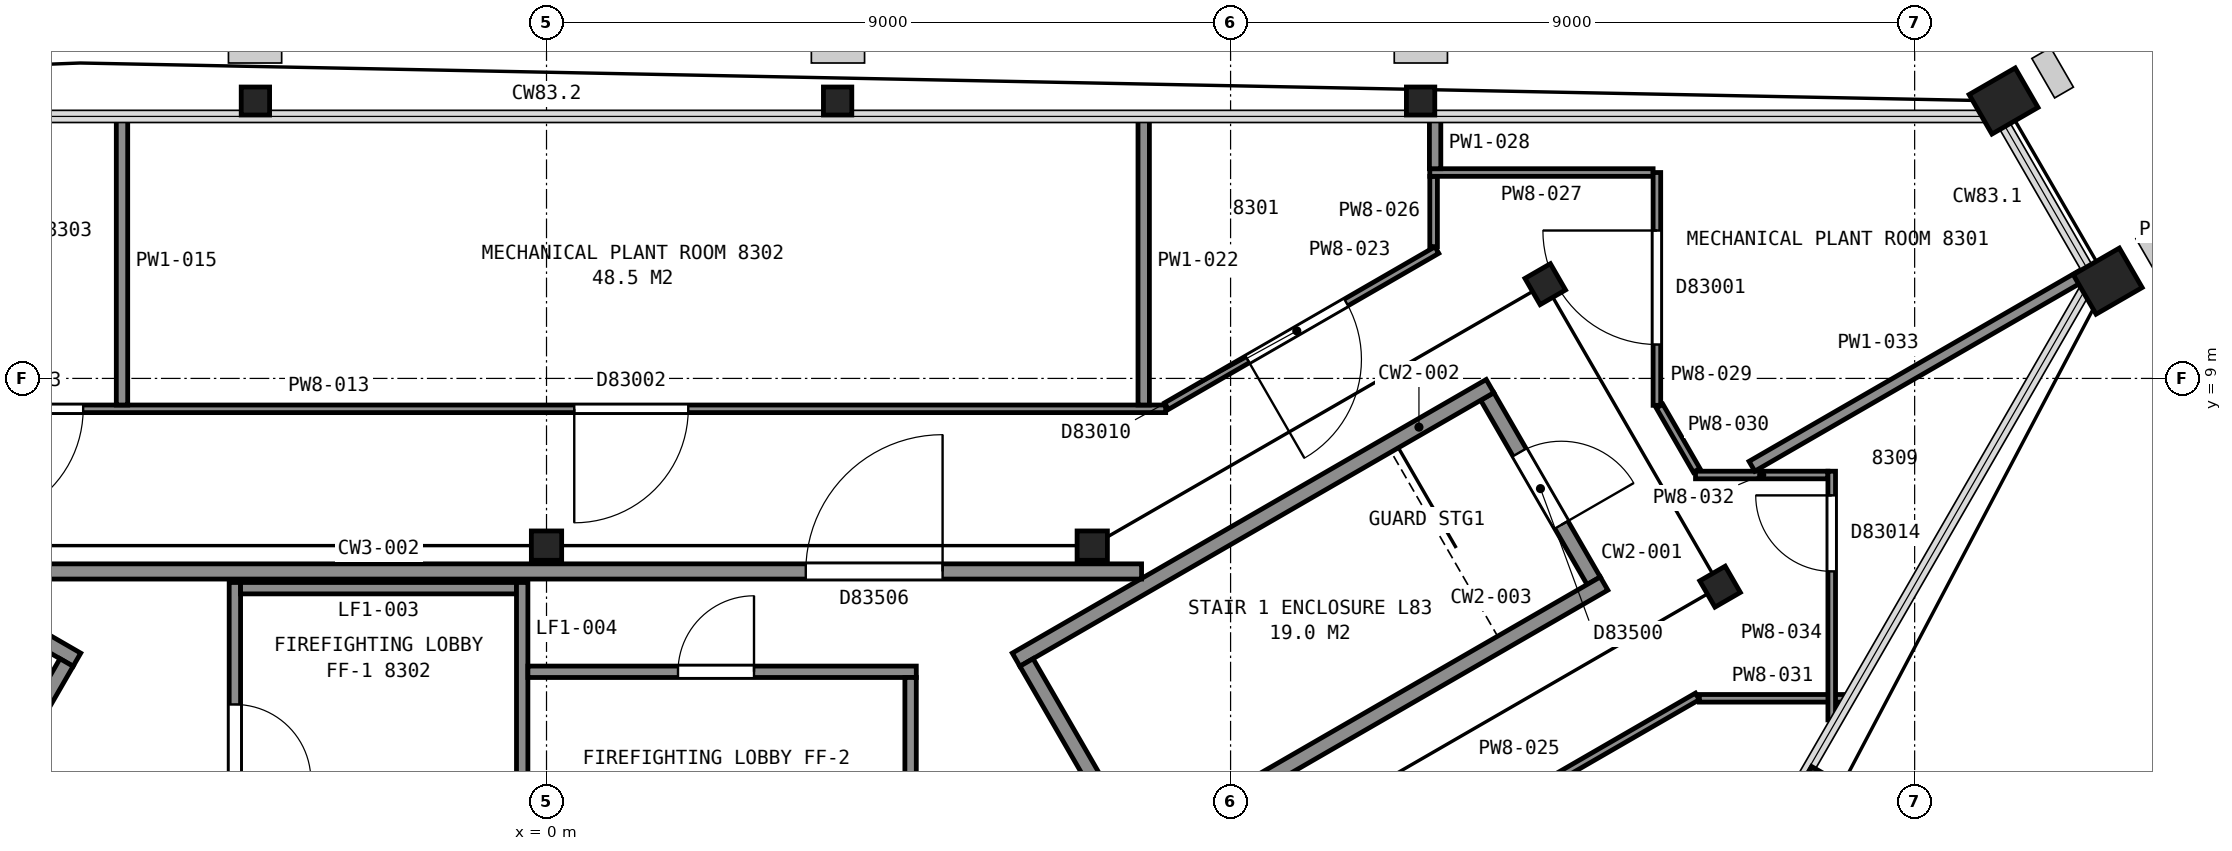
"""IFC4 building model, lengths in metres.
Left out: names, types, materials, properties, quantities, classifications, styles, units other than length and angle.
Written with IfcOpenShell. Run it as: python <this file> out.ifc"""

import sys

from ifc_helpers import new_model, si_unit, direction, frame, frame_2d, origin, origin_2d, place, context, subcontext, project, spatial, rectangle, hollow_rectangle, i_section, extrude, element, fill, save


model = new_model("IFC4")
c1 = context("Model", 3, precision=1e-05, world=origin(), true_north=direction((0.0, 1.0)))
c2 = subcontext(c1, "Body", "Model", "MODEL_VIEW")
j1 = project(units=[si_unit("LENGTHUNIT", "METRE"), si_unit("PLANEANGLEUNIT", "RADIAN")], contexts=[c1])
p1 = place(None, origin())
s1 = spatial("IfcSite", under=j1, at=p1, CompositionType="ELEMENT")
p2 = place(p1, origin())
s2 = spatial("IfcBuilding", under=s1, at=p2, CompositionType="ELEMENT")
p3 = place(p2, frame((0.0, 0.0, 329.4)))
s3 = spatial("IfcBuildingStorey", under=s2, at=p3, CompositionType="ELEMENT", Elevation=329.4)
p4 = place(p3, frame((19.17, 12.65, 0.0), z_axis=(0.0, 0.0, 1.0), x_axis=(0.5, -0.866025403784, 0.0)))
e1 = element("IfcColumn", 1, at=p4, inside=s3, PredefinedType="COLUMN", context=c2, shape_type="SweptSolid", body=[
    extrude(hollow_rectangle(XDim=0.6, YDim=0.7, WallThickness=0.04, at=origin_2d()), origin(), (0.0, 0.0, 1.0), 3.9),
])
p5 = place(p3, frame((11.5, 12.65, 0.0), z_axis=(0.0, 0.0, 1.0), x_axis=(1.0, 0.0, 0.0)))
e2 = element("IfcColumn", 2, at=p5, inside=s3, PredefinedType="COLUMN", context=c2, shape_type="SweptSolid", body=[
    extrude(i_section(OverallWidth=0.373, OverallDepth=0.368, WebThickness=0.015, FlangeThickness=0.024, FilletRadius=0.015, at=origin_2d()), origin(), (0.0, 0.0, 1.0), 4.13),
])
p6 = place(p3, frame((3.83, 12.65, 0.0), z_axis=(0.0, 0.0, 1.0), x_axis=(1.0, 0.0, 0.0)))
e3 = element("IfcColumn", 3, at=p6, inside=s3, PredefinedType="COLUMN", context=c2, shape_type="SweptSolid", body=[
    extrude(i_section(OverallWidth=0.373, OverallDepth=0.368, WebThickness=0.015, FlangeThickness=0.024, FilletRadius=0.015, at=origin_2d()), origin(), (0.0, 0.0, 1.0), 4.37),
])
p7 = place(p3, frame((-3.83, 12.65, 0.0), z_axis=(0.0, 0.0, 1.0), x_axis=(1.0, 0.0, 0.0)))
e4 = element("IfcColumn", 4, at=p7, inside=s3, PredefinedType="COLUMN", context=c2, shape_type="SweptSolid", body=[
    extrude(i_section(OverallWidth=0.373, OverallDepth=0.368, WebThickness=0.015, FlangeThickness=0.024, FilletRadius=0.015, at=origin_2d()), origin(), (0.0, 0.0, 1.0), 4.6),
])
p8 = place(p3, frame((16.71, 3.64, 0.0), z_axis=(0.0, 0.0, 1.0), x_axis=(-0.5, -0.866025403784, 0.0)))
e5 = element("IfcColumn", 5, at=p8, inside=s3, PredefinedType="COLUMN", context=c2, shape_type="SweptSolid", body=[
    extrude(i_section(OverallWidth=0.373, OverallDepth=0.368, WebThickness=0.015, FlangeThickness=0.024, FilletRadius=0.015, at=origin_2d()), origin(), (0.0, 0.0, 1.0), 4.34),
])
p9 = place(p3, frame((20.54, 10.28, 0.0), z_axis=(0.0, 0.0, 1.0), x_axis=(0.5, -0.866025403784, 0.0)))
e6 = element("IfcColumn", 6, at=p9, inside=s3, PredefinedType="COLUMN", context=c2, shape_type="SweptSolid", body=[
    extrude(hollow_rectangle(XDim=0.6, YDim=0.7, WallThickness=0.04, at=origin_2d()), origin(), (0.0, 0.0, 1.0), 3.9),
])
for number, where, z_axis, x_axis in (
    (7, (15.44, 6.26, 0.0), (0.0, 0.0, 1.0), (0.5, -0.866, 0.0)),
    (8, (13.14, 10.24, 0.0), (0.0, 0.0, 1.0), (0.5, -0.866, 0.0)),
    (9, (7.18, 6.8, 0.0), (0.0, 0.0, 1.0), (1.0, 0.0, 0.0)),
    (10, (0.0, 6.8, 0.0), (0.0, 0.0, 1.0), (1.0, 0.0, 0.0)),
):
    element("IfcColumn", number, at=place(p3, frame(where, z_axis=z_axis, x_axis=x_axis)), inside=s3, PredefinedType="COLUMN", context=c2, shape_type="SweptSolid", body=[
        extrude(i_section(OverallWidth=0.399, OverallDepth=0.386, WebThickness=0.021, FlangeThickness=0.033, FilletRadius=0.015, at=origin_2d()), origin(), (0.0, 0.0, 1.0), 4.2),
    ])
p10 = place(p3, frame((13.777, 6.338, 0.0), z_axis=(0.0, 0.0, 1.0), x_axis=(-0.500049511043, 0.865996816683, 0.0)))
e11 = element("IfcWall", 11, at=p10, inside=s3, PredefinedType="PARTITIONING", context=c2, shape_type="SweptSolid", body=[
    extrude(rectangle(XDim=2.8, YDim=0.2, at=frame_2d((1.4, 0.0))), origin(), (0.0, 0.0, 1.0), 4.2),
])
p11 = place(p10, frame((0.85, 0.0, 0.0)))
e12 = element("IfcOpeningElement", 12, at=p11, cuts=e11, PredefinedType="OPENING", context=c2, shape_type="SweptSolid", body=[
    extrude(rectangle(XDim=1.1, YDim=2.1, at=frame_2d((0.55, 1.05))), frame((0.0, 0.11, 0.0), z_axis=(0.0, -1.0, 0.0), x_axis=(1.0, 0.0, 0.0)), (0.0, 0.0, 1.0), 0.22),
])
for number, where, z_axis, x_axis in (
    (13, (6.178, 5.299, 0.0), (0.0, 0.0, 1.0), (0.866, 0.5, 0.0)),
    (14, (7.678, 2.701, 0.0), (0.0, 0.0, 1.0), (0.866, 0.5, 0.0)),
):
    element("IfcWall", number, at=place(p3, frame(where, z_axis=z_axis, x_axis=x_axis)), inside=s3, PredefinedType="PARTITIONING", context=c2, shape_type="SweptSolid", body=[
        extrude(rectangle(XDim=7.2, YDim=0.2, at=frame_2d((3.6, 0.0))), origin(), (0.0, 0.0, 1.0), 4.2),
    ])
p12 = place(p3, frame((7.715, 2.838, 0.0), z_axis=(0.0, 0.0, 1.0), x_axis=(-0.500049511043, 0.865996816683, 0.0)))
e15 = element("IfcWall", 15, at=p12, inside=s3, PredefinedType="PARTITIONING", context=c2, shape_type="SweptSolid", body=[
    extrude(rectangle(XDim=2.8, YDim=0.2, at=frame_2d((1.4, 0.0))), origin(), (0.0, 0.0, 1.0), 4.2),
])
p13 = place(p3, frame((-6.178, 5.299, 0.0), z_axis=(0.0, 0.0, 1.0), x_axis=(-0.866033125095, 0.499986626058, 0.0)))
e16 = element("IfcWall", 16, at=p13, inside=s3, PredefinedType="PARTITIONING", context=c2, shape_type="SweptSolid", body=[
    extrude(rectangle(XDim=7.2, YDim=0.2, at=frame_2d((3.6, 0.0))), origin(), (0.0, 0.0, 1.0), 4.2),
])
p14 = place(p3, frame((-6.315, 5.262, 0.0), z_axis=(0.0, 0.0, 1.0), x_axis=(-0.500049511043, -0.865996816683, 0.0)))
e17 = element("IfcWall", 17, at=p14, inside=s3, PredefinedType="PARTITIONING", context=c2, shape_type="SweptSolid", body=[
    extrude(rectangle(XDim=2.8, YDim=0.2, at=frame_2d((1.4, 0.0))), origin(), (0.0, 0.0, 1.0), 4.2),
])
p15 = place(p3, frame((7.829, 6.46, 0.0), z_axis=(0.0, 0.0, 1.0), x_axis=(-1.0, 0.0, 0.0)))
e18 = element("IfcWall", 18, at=p15, inside=s3, PredefinedType="PARTITIONING", context=c2, shape_type="SweptSolid", body=[
    extrude(rectangle(XDim=15.658, YDim=0.2, at=frame_2d((7.829, 0.0))), origin(), (0.0, 0.0, 1.0), 3.9),
])
p16 = place(p15, frame((2.618, 0.0, 0.0)))
e19 = element("IfcOpeningElement", 19, at=p16, cuts=e18, PredefinedType="OPENING", context=c2, shape_type="SweptSolid", body=[
    extrude(rectangle(XDim=1.8, YDim=2.1, at=frame_2d((0.9, 1.05))), frame((0.0, 0.11, 0.0), z_axis=(0.0, -1.0, 0.0), x_axis=(1.0, 0.0, 0.0)), (0.0, 0.0, 1.0), 0.22),
])
p17 = place(p3, frame((-4.1, 2.085, 0.0), z_axis=(0.0, 0.0, 1.0), x_axis=(0.0, 1.0, 0.0)))
e20 = element("IfcWall", 20, at=p17, inside=s3, PredefinedType="PARTITIONING", context=c2, shape_type="SweptSolid", body=[
    extrude(rectangle(XDim=4.23, YDim=0.15, at=frame_2d((2.115, 0.0))), origin(), (0.0, 0.0, 1.0), 3.9),
])
p18 = place(p17, frame((1.625, 0.0, 0.0)))
e21 = element("IfcOpeningElement", 21, at=p18, cuts=e20, PredefinedType="OPENING", context=c2, shape_type="SweptSolid", body=[
    extrude(rectangle(XDim=1.0, YDim=2.1, at=frame_2d((0.5, 1.05))), frame((0.0, 0.085, 0.0), z_axis=(0.0, -1.0, 0.0), x_axis=(1.0, 0.0, 0.0)), (0.0, 0.0, 1.0), 0.17),
])
p19 = place(p3, frame((-4.025, 6.24, 0.0), z_axis=(0.0, 0.0, 1.0), x_axis=(1.0, 0.0, 0.0)))
e22 = element("IfcWall", 22, at=p19, inside=s3, PredefinedType="PARTITIONING", context=c2, shape_type="SweptSolid", body=[
    extrude(rectangle(XDim=3.63, YDim=0.15, at=frame_2d((1.815, 0.0))), origin(), (0.0, 0.0, 1.0), 3.9),
])
p20 = place(p3, frame((-0.32, 2.252, 0.0), z_axis=(0.0, 0.0, 1.0), x_axis=(0.0, 1.0, 0.0)))
e23 = element("IfcWall", 23, at=p20, inside=s3, PredefinedType="PARTITIONING", context=c2, shape_type="SweptSolid", body=[
    extrude(rectangle(XDim=4.063, YDim=0.15, at=frame_2d((2.031, 0.0))), origin(), (0.0, 0.0, 1.0), 3.9),
])
p21 = place(p3, frame((-0.245, 5.14, 0.0), z_axis=(0.0, 0.0, 1.0), x_axis=(1.0, 0.0, 0.0)))
e24 = element("IfcWall", 24, at=p21, inside=s3, PredefinedType="PARTITIONING", context=c2, shape_type="SweptSolid", body=[
    extrude(rectangle(XDim=5.11, YDim=0.15, at=frame_2d((2.555, 0.0))), origin(), (0.0, 0.0, 1.0), 3.9),
])
p22 = place(p21, frame((1.975, 0.0, 0.0)))
e25 = element("IfcOpeningElement", 25, at=p22, cuts=e24, PredefinedType="OPENING", context=c2, shape_type="SweptSolid", body=[
    extrude(rectangle(XDim=1.0, YDim=2.1, at=frame_2d((0.5, 1.05))), frame((0.0, 0.085, 0.0), z_axis=(0.0, -1.0, 0.0), x_axis=(1.0, 0.0, 0.0)), (0.0, 0.0, 1.0), 0.17),
])
p23 = place(p3, frame((4.79, 2.085, 0.0), z_axis=(0.0, 0.0, 1.0), x_axis=(0.0, 1.0, 0.0)))
e26 = element("IfcWall", 26, at=p23, inside=s3, PredefinedType="PARTITIONING", context=c2, shape_type="SweptSolid", body=[
    extrude(rectangle(XDim=2.98, YDim=0.15, at=frame_2d((1.49, 0.0))), origin(), (0.0, 0.0, 1.0), 3.9),
])
p24 = place(p3, frame((-8.146, 8.6, 0.0), z_axis=(0.0, 0.0, 1.0), x_axis=(1.0, 0.0, 0.0)))
e27 = element("IfcWall", 27, at=p24, inside=s3, PredefinedType="PARTITIONING", context=c2, shape_type="SweptSolid", body=[
    extrude(rectangle(XDim=16.292, YDim=0.1, at=frame_2d((8.146, 0.0))), origin(), (0.0, 0.0, 1.0), 3.297),
])
p25 = place(p24, frame((8.511, 0.0, 0.0)))
e28 = element("IfcOpeningElement", 28, at=p25, cuts=e27, PredefinedType="OPENING", context=c2, shape_type="SweptSolid", body=[
    extrude(rectangle(XDim=1.5, YDim=2.1, at=frame_2d((0.75, 1.05))), frame((0.0, 0.06, 0.0), z_axis=(0.0, -1.0, 0.0), x_axis=(1.0, 0.0, 0.0)), (0.0, 0.0, 1.0), 0.12),
])
p26 = place(p24, frame((0.55, 0.0, 0.0)))
e29 = element("IfcOpeningElement", 29, at=p26, cuts=e27, PredefinedType="OPENING", context=c2, shape_type="SweptSolid", body=[
    extrude(rectangle(XDim=1.5, YDim=2.1, at=frame_2d((0.75, 1.05))), frame((0.0, 0.06, 0.0), z_axis=(0.0, -1.0, 0.0), x_axis=(1.0, 0.0, 0.0)), (0.0, 0.0, 1.0), 0.12),
])
for number, where, z_axis, x_axis in (
    (30, (-5.585, 8.65, 0.0), (0.0, 0.0, 1.0), (0.0, 1.0, 0.0)),
    (31, (7.857, 8.65, 0.0), (0.0, 0.0, 1.0), (0.0, 1.0, 0.0)),
):
    element("IfcWall", number, at=place(p3, frame(where, z_axis=z_axis, x_axis=x_axis)), inside=s3, PredefinedType="PARTITIONING", context=c2, shape_type="SweptSolid", body=[
        extrude(rectangle(XDim=3.783, YDim=0.15, at=frame_2d((1.892, 0.0))), origin(), (0.0, 0.0, 1.0), 3.297),
    ])
p27 = place(p3, frame((8.157, 8.635, 0.0), z_axis=(0.0, 0.0, 1.0), x_axis=(0.866029215606, 0.499993397673, 0.0)))
e32 = element("IfcWall", 32, at=p27, inside=s3, PredefinedType="PARTITIONING", context=c2, shape_type="SweptSolid", body=[
    extrude(rectangle(XDim=4.108, YDim=0.1, at=frame_2d((2.054, 0.0))), origin(), (0.0, 0.0, 1.0), 3.297),
])
p28 = place(p27, frame((1.23, 0.0, 0.0)))
e33 = element("IfcOpeningElement", 33, at=p28, cuts=e32, PredefinedType="OPENING", context=c2, shape_type="SweptSolid", body=[
    extrude(rectangle(XDim=1.5, YDim=2.1, at=frame_2d((0.75, 1.05))), frame((0.0, 0.06, 0.0), z_axis=(0.0, -1.0, 0.0), x_axis=(1.0, 0.0, 0.0)), (0.0, 0.0, 1.0), 0.12),
])
p29 = place(p3, frame((11.557, 2.746, 0.0), z_axis=(0.0, 0.0, 1.0), x_axis=(0.866005840187, 0.500033883614, 0.0)))
e34 = element("IfcWall", 34, at=p29, inside=s3, PredefinedType="PARTITIONING", context=c2, shape_type="SweptSolid", body=[
    extrude(rectangle(XDim=4.139, YDim=0.1, at=frame_2d((2.07, 0.0))), origin(), (0.0, 0.0, 1.0), 3.297),
])
p30 = place(p3, frame((11.671, 10.734, 0.0), z_axis=(0.0, 0.0, 1.0), x_axis=(0.0, 1.0, 0.0)))
e35 = element("IfcWall", 35, at=p30, inside=s3, PredefinedType="PARTITIONING", context=c2, shape_type="SweptSolid", body=[
    extrude(rectangle(XDim=0.925, YDim=0.1, at=frame_2d((0.462, 0.0))), origin(), (0.0, 0.0, 1.0), 3.297),
])
p31 = place(p3, frame((11.621, 11.709, 0.0), z_axis=(0.0, 0.0, 1.0), x_axis=(1.0, 0.0, 0.0)))
e36 = element("IfcWall", 36, at=p31, inside=s3, PredefinedType="PARTITIONING", context=c2, shape_type="SweptSolid", body=[
    extrude(rectangle(XDim=2.938, YDim=0.1, at=frame_2d((1.469, 0.0))), origin(), (0.0, 0.0, 1.0), 3.297),
])
p32 = place(p3, frame((11.691, 11.759, 0.0), z_axis=(0.0, 0.0, 1.0), x_axis=(0.0, 1.0, 0.0)))
e37 = element("IfcWall", 37, at=p32, inside=s3, PredefinedType="PARTITIONING", context=c2, shape_type="SweptSolid", body=[
    extrude(rectangle(XDim=0.674, YDim=0.15, at=frame_2d((0.337, 0.0))), origin(), (0.0, 0.0, 1.0), 3.297),
])
p33 = place(p3, frame((14.609, 11.709, 0.0), z_axis=(0.0, 0.0, 1.0), x_axis=(0.0, -1.0, 0.0)))
e38 = element("IfcWall", 38, at=p33, inside=s3, PredefinedType="PARTITIONING", context=c2, shape_type="SweptSolid", body=[
    extrude(rectangle(XDim=3.063, YDim=0.1, at=frame_2d((1.531, 0.0))), origin(), (0.0, 0.0, 1.0), 3.297),
])
p34 = place(p33, frame((0.763, 0.0, 0.0)))
e39 = element("IfcOpeningElement", 39, at=p34, cuts=e38, PredefinedType="OPENING", context=c2, shape_type="SweptSolid", body=[
    extrude(rectangle(XDim=1.5, YDim=2.1, at=frame_2d((0.75, 1.05))), frame((0.0, 0.06, 0.0), z_axis=(0.0, -1.0, 0.0), x_axis=(1.0, 0.0, 0.0)), (0.0, 0.0, 1.0), 0.12),
])
p35 = place(p3, frame((14.644, 8.635, 0.0), z_axis=(0.0, 0.0, 1.0), x_axis=(0.499823463829, -0.866127303003, 0.0)))
e40 = element("IfcWall", 40, at=p35, inside=s3, PredefinedType="PARTITIONING", context=c2, shape_type="SweptSolid", body=[
    extrude(rectangle(XDim=0.976, YDim=0.1, at=frame_2d((0.488, 0.0))), origin(), (0.0, 0.0, 1.0), 3.297),
])
p36 = place(p3, frame((15.168, 4.791, 0.0), z_axis=(0.0, 0.0, 1.0), x_axis=(1.0, 0.0, 0.0)))
e41 = element("IfcWall", 41, at=p36, inside=s3, PredefinedType="PARTITIONING", context=c2, shape_type="SweptSolid", body=[
    extrude(rectangle(XDim=1.926, YDim=0.1, at=frame_2d((0.963, 0.0))), origin(), (0.0, 0.0, 1.0), 3.297),
])
p37 = place(p3, frame((15.117, 7.729, 0.0), z_axis=(0.0, 0.0, 1.0), x_axis=(1.0, 0.0, 0.0)))
e42 = element("IfcWall", 42, at=p37, inside=s3, PredefinedType="PARTITIONING", context=c2, shape_type="SweptSolid", body=[
    extrude(rectangle(XDim=1.742, YDim=0.1, at=frame_2d((0.871, 0.0))), origin(), (0.0, 0.0, 1.0), 3.297),
])
p38 = place(p3, frame((15.859, 7.844, 0.0), z_axis=(0.0, 0.0, 1.0), x_axis=(0.865941920763, 0.500144568965, 0.0)))
e43 = element("IfcWall", 43, at=p38, inside=s3, PredefinedType="PARTITIONING", context=c2, shape_type="SweptSolid", body=[
    extrude(rectangle(XDim=5.106, YDim=0.15, at=frame_2d((2.553, 0.0))), origin(), (0.0, 0.0, 1.0), 3.297),
])
p39 = place(p3, frame((16.909, 7.779, 0.0), z_axis=(0.0, 0.0, 1.0), x_axis=(0.0, -1.0, 0.0)))
e44 = element("IfcWall", 44, at=p39, inside=s3, PredefinedType="PARTITIONING", context=c2, shape_type="SweptSolid", body=[
    extrude(rectangle(XDim=3.272, YDim=0.1, at=frame_2d((1.636, 0.0))), origin(), (0.0, 0.0, 1.0), 3.297),
])
p40 = place(p39, frame((0.318, 0.0, 0.0)))
e45 = element("IfcOpeningElement", 45, at=p40, cuts=e44, PredefinedType="OPENING", context=c2, shape_type="SweptSolid", body=[
    extrude(rectangle(XDim=1.0, YDim=2.1, at=frame_2d((0.5, 1.05))), frame((0.0, 0.06, 0.0), z_axis=(0.0, -1.0, 0.0), x_axis=(1.0, 0.0, 0.0)), (0.0, 0.0, 1.0), 0.12),
])
p41 = place(p11, origin())
e46 = element("IfcDoor", 46, at=p41, inside=s3, OperationType="SINGLE_SWING_LEFT", PredefinedType="DOOR", context=c2, shape_type="SweptSolid", body=[
    extrude(rectangle(XDim=1.1, YDim=2.1, at=frame_2d((0.55, 1.05))), frame((0.0, 0.025, 0.0), z_axis=(0.0, -1.0, 0.0), x_axis=(1.0, 0.0, 0.0)), (0.0, 0.0, 1.0), 0.05),
])
fill(e12, e46)
p42 = place(p16, origin())
e47 = element("IfcDoor", 47, at=p42, inside=s3, OperationType="DOUBLE_DOOR_SINGLE_SWING", PredefinedType="DOOR", context=c2, shape_type="SweptSolid", body=[
    extrude(rectangle(XDim=1.8, YDim=2.1, at=frame_2d((0.9, 1.05))), frame((0.0, 0.025, 0.0), z_axis=(0.0, -1.0, 0.0), x_axis=(1.0, 0.0, 0.0)), (0.0, 0.0, 1.0), 0.05),
])
fill(e19, e47)
p43 = place(p18, origin())
e48 = element("IfcDoor", 48, at=p43, inside=s3, OperationType="SINGLE_SWING_LEFT", PredefinedType="DOOR", context=c2, shape_type="SweptSolid", body=[
    extrude(rectangle(XDim=1.0, YDim=2.1, at=frame_2d((0.5, 1.05))), frame((0.0, 0.025, 0.0), z_axis=(0.0, -1.0, 0.0), x_axis=(1.0, 0.0, 0.0)), (0.0, 0.0, 1.0), 0.05),
])
fill(e21, e48)
p44 = place(p22, origin())
e49 = element("IfcDoor", 49, at=p44, inside=s3, OperationType="SINGLE_SWING_RIGHT", PredefinedType="DOOR", context=c2, shape_type="SweptSolid", body=[
    extrude(rectangle(XDim=1.0, YDim=2.1, at=frame_2d((0.5, 1.05))), frame((0.0, 0.025, 0.0), z_axis=(0.0, -1.0, 0.0), x_axis=(1.0, 0.0, 0.0)), (0.0, 0.0, 1.0), 0.05),
])
fill(e25, e49)
p45 = place(p25, origin())
e50 = element("IfcDoor", 50, at=p45, inside=s3, OperationType="DOUBLE_DOOR_SINGLE_SWING", PredefinedType="DOOR", context=c2, shape_type="SweptSolid", body=[
    extrude(rectangle(XDim=1.5, YDim=2.1, at=frame_2d((0.75, 1.05))), frame((0.0, 0.025, 0.0), z_axis=(0.0, -1.0, 0.0), x_axis=(1.0, 0.0, 0.0)), (0.0, 0.0, 1.0), 0.05),
])
fill(e28, e50)
p46 = place(p26, origin())
e51 = element("IfcDoor", 51, at=p46, inside=s3, OperationType="DOUBLE_DOOR_SINGLE_SWING", PredefinedType="DOOR", context=c2, shape_type="SweptSolid", body=[
    extrude(rectangle(XDim=1.5, YDim=2.1, at=frame_2d((0.75, 1.05))), frame((0.0, 0.025, 0.0), z_axis=(0.0, -1.0, 0.0), x_axis=(1.0, 0.0, 0.0)), (0.0, 0.0, 1.0), 0.05),
])
fill(e29, e51)
p47 = place(p28, origin())
e52 = element("IfcDoor", 52, at=p47, inside=s3, OperationType="DOUBLE_DOOR_SINGLE_SWING", PredefinedType="DOOR", context=c2, shape_type="SweptSolid", body=[
    extrude(rectangle(XDim=1.5, YDim=2.1, at=frame_2d((0.75, 1.05))), frame((0.0, 0.025, 0.0), z_axis=(0.0, -1.0, 0.0), x_axis=(1.0, 0.0, 0.0)), (0.0, 0.0, 1.0), 0.05),
])
fill(e33, e52)
p48 = place(p34, origin())
e53 = element("IfcDoor", 53, at=p48, inside=s3, OperationType="DOUBLE_DOOR_SINGLE_SWING", PredefinedType="DOOR", context=c2, shape_type="SweptSolid", body=[
    extrude(rectangle(XDim=1.5, YDim=2.1, at=frame_2d((0.75, 1.05))), frame((0.0, 0.025, 0.0), z_axis=(0.0, -1.0, 0.0), x_axis=(1.0, 0.0, 0.0)), (0.0, 0.0, 1.0), 0.05),
])
fill(e39, e53)
p49 = place(p40, origin())
e54 = element("IfcDoor", 54, at=p49, inside=s3, OperationType="SINGLE_SWING_LEFT", PredefinedType="DOOR", context=c2, shape_type="SweptSolid", body=[
    extrude(rectangle(XDim=1.0, YDim=2.1, at=frame_2d((0.5, 1.05))), frame((0.0, 0.025, 0.0), z_axis=(0.0, -1.0, 0.0), x_axis=(1.0, 0.0, 0.0)), (0.0, 0.0, 1.0), 0.05),
])
fill(e45, e54)
save(model, sys.argv[1])
